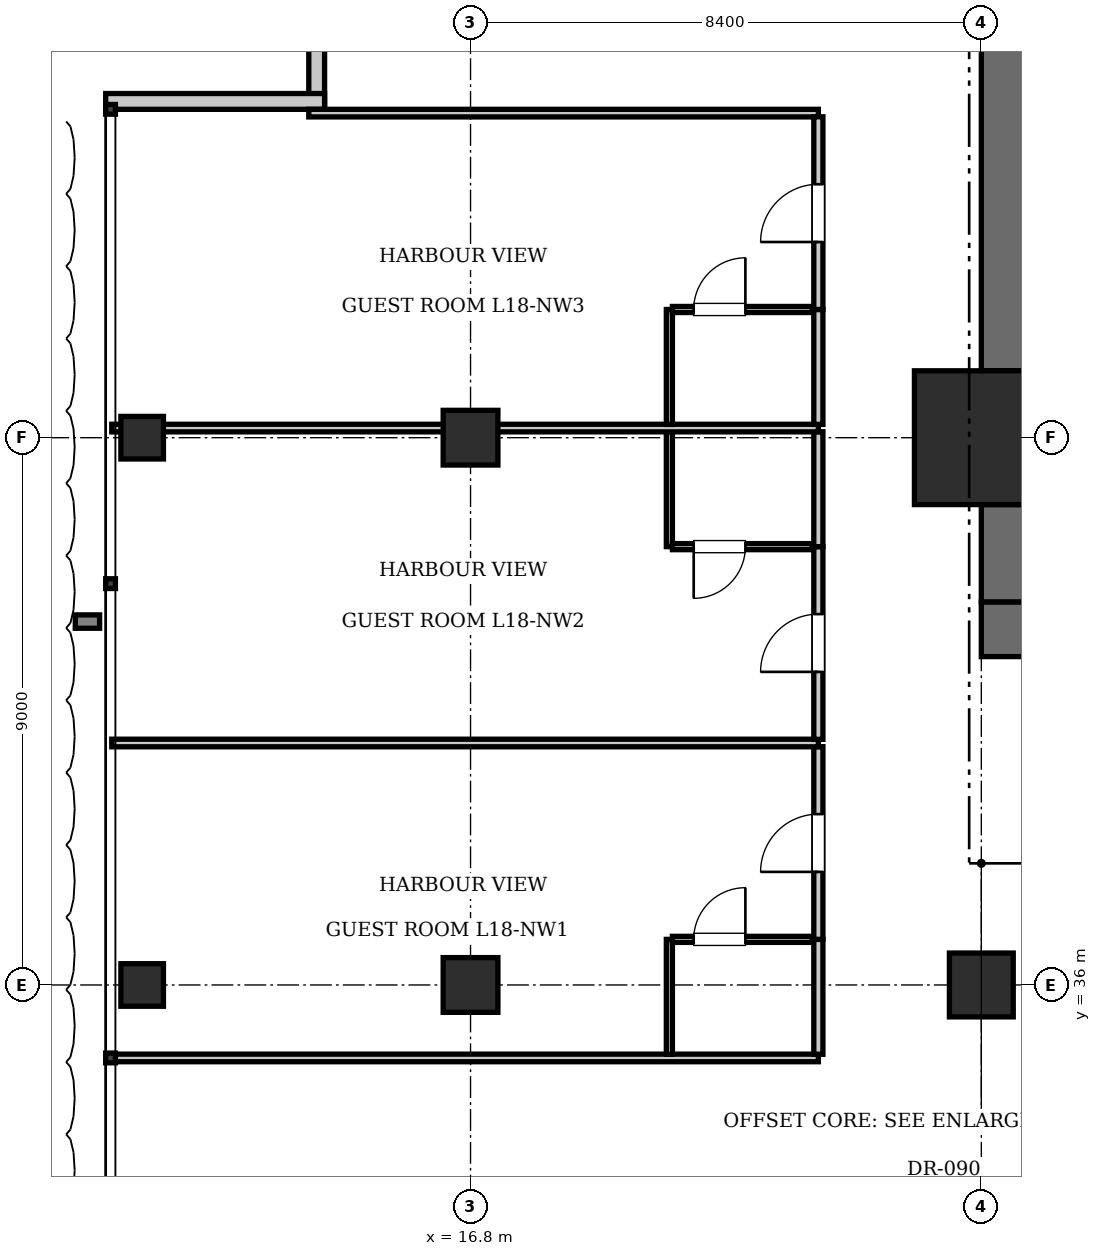
"""IFC4 building model, lengths in metres.
Left out: names, types, materials, properties, quantities, classifications, styles, units other than length and angle.
Written with IfcOpenShell. Run it as: python <this file> out.ifc"""

import sys

from ifc_helpers import new_model, si_unit, direction, frame, frame_2d, origin, origin_2d, place, context, subcontext, project, spatial, rectangle, i_section, extrude, element, fill, save


model = new_model("IFC4")
c1 = context("Model", 3, precision=1e-05, world=origin(), true_north=direction((0.0, 1.0)))
c2 = subcontext(c1, "Body", "Model", "MODEL_VIEW")
j1 = project(units=[si_unit("LENGTHUNIT", "METRE"), si_unit("PLANEANGLEUNIT", "RADIAN")], contexts=[c1])
p1 = place(None, origin())
s1 = spatial("IfcSite", under=j1, at=p1, CompositionType="ELEMENT")
p2 = place(p1, origin())
s2 = spatial("IfcBuilding", under=s1, at=p2, CompositionType="ELEMENT")
p3 = place(p2, frame((0.0, 0.0, 77.0)))
s3 = spatial("IfcBuildingStorey", under=s2, at=p3, CompositionType="ELEMENT", Elevation=77.0)
p4 = place(p3, frame((25.2, 45.0, 0.0), z_axis=(0.0, 0.0, 1.0), x_axis=(1.0, 0.0, 0.0)))
e1 = element("IfcColumn", 1, at=p4, inside=s3, PredefinedType="COLUMN", context=c2, shape_type="SweptSolid", body=[
    extrude(rectangle(XDim=2.2, YDim=2.2, at=origin_2d()), origin(), (0.0, 0.0, 1.0), 3.85),
])
p5 = place(p3, frame((25.2, 41.85, 0.0), z_axis=(0.0, 0.0, 1.0), x_axis=(1.0, 0.0, 0.0)))
e2 = element("IfcWall", 2, at=p5, inside=s3, PredefinedType="SHEAR", context=c2, shape_type="SweptSolid", body=[
    extrude(rectangle(XDim=6.8, YDim=0.9, at=frame_2d((3.4, 0.0))), origin(), (0.0, 0.0, 1.0), 3.85),
])
p6 = place(p5, frame((1.65, 0.0, 0.0)))
e3 = element("IfcOpeningElement", 3, at=p6, cuts=e2, PredefinedType="OPENING", context=c2, shape_type="SweptSolid", body=[
    extrude(rectangle(XDim=1.15, YDim=2.15, at=frame_2d((0.575, 1.075))), frame((0.0, 0.46, 0.0), z_axis=(0.0, -1.0, 0.0), x_axis=(1.0, 0.0, 0.0)), (0.0, 0.0, 1.0), 0.92),
])
p7 = place(p5, frame((5.15, 0.0, 0.0)))
e4 = element("IfcOpeningElement", 4, at=p7, cuts=e2, PredefinedType="OPENING", context=c2, shape_type="SweptSolid", body=[
    extrude(rectangle(XDim=1.1, YDim=2.2, at=frame_2d((0.55, 1.1))), frame((0.0, 0.46, 0.0), z_axis=(0.0, -1.0, 0.0), x_axis=(1.0, 0.0, 0.0)), (0.0, 0.0, 1.0), 0.92),
])
p8 = place(p3, frame((25.65, 42.3, 0.0), z_axis=(0.0, 0.0, 1.0), x_axis=(0.0, 1.0, 0.0)))
e5 = element("IfcWall", 5, at=p8, inside=s3, PredefinedType="SHEAR", context=c2, shape_type="SweptSolid", body=[
    extrude(rectangle(XDim=1.6, YDim=0.9, at=frame_2d((0.8, 0.0))), origin(), (0.0, 0.0, 1.0), 3.85),
])
p9 = place(p3, frame((25.65, 46.1, 0.0), z_axis=(0.0, 0.0, 1.0), x_axis=(0.0, 1.0, 0.0)))
e6 = element("IfcWall", 6, at=p9, inside=s3, PredefinedType="SHEAR", context=c2, shape_type="SweptSolid", body=[
    extrude(rectangle(XDim=7.0, YDim=0.9, at=frame_2d((3.5, 0.0))), origin(), (0.0, 0.0, 1.0), 3.85),
])
p10 = place(p3, frame((25.2, 36.0, 0.0), z_axis=(0.0, 0.0, 1.0), x_axis=(1.0, 0.0, 0.0)))
e7 = element("IfcColumn", 7, at=p10, inside=s3, PredefinedType="COLUMN", context=c2, shape_type="SweptSolid", body=[
    extrude(rectangle(XDim=1.05, YDim=1.05, at=origin_2d()), origin(), (0.0, 0.0, 1.0), 3.85),
])
for number, where, z_axis, x_axis in (
    (8, (16.8, 36.0, 0.0), (0.0, 0.0, 1.0), (1.0, 0.0, 0.0)),
    (9, (16.8, 45.0, 0.0), (0.0, 0.0, 1.0), (1.0, 0.0, 0.0)),
):
    element("IfcColumn", number, at=place(p3, frame(where, z_axis=z_axis, x_axis=x_axis)), inside=s3, PredefinedType="COLUMN", context=c2, shape_type="SweptSolid", body=[
        extrude(rectangle(XDim=0.9, YDim=0.9, at=origin_2d()), origin(), (0.0, 0.0, 1.0), 3.85),
    ])
for number, where, z_axis, x_axis in (
    (10, (11.4, 36.0, 0.0), (0.0, 0.0, 1.0), (1.0, 0.0, 0.0)),
    (11, (11.4, 45.0, 0.0), (0.0, 0.0, 1.0), (1.0, 0.0, 0.0)),
):
    element("IfcColumn", number, at=place(p3, frame(where, z_axis=z_axis, x_axis=x_axis)), inside=s3, PredefinedType="COLUMN", context=c2, shape_type="SweptSolid", body=[
        extrude(i_section(OverallWidth=0.7, OverallDepth=0.7, WebThickness=0.028, FlangeThickness=0.044, at=origin_2d()), origin(), (0.0, 0.0, 1.0), 3.85),
    ])
p11 = place(p3, frame((14.27, 50.4, 0.0), z_axis=(0.0, 0.0, 1.0), x_axis=(0.0, 1.0, 0.0)))
e12 = element("IfcWall", 12, at=p11, inside=s3, PredefinedType="SOLIDWALL", context=c2, shape_type="SweptSolid", body=[
    extrude(rectangle(XDim=3.6, YDim=0.26, at=frame_2d((1.8, 0.0))), origin(), (0.0, 0.0, 1.0), 3.61),
])
p12 = place(p3, frame((10.8, 50.53, 0.0), z_axis=(0.0, 0.0, 1.0), x_axis=(1.0, 0.0, 0.0)))
e13 = element("IfcWall", 13, at=p12, inside=s3, PredefinedType="SOLIDWALL", context=c2, shape_type="SweptSolid", body=[
    extrude(rectangle(XDim=3.6, YDim=0.26, at=frame_2d((1.8, 0.0))), origin(), (0.0, 0.0, 1.0), 3.61),
])
p13 = place(p3, frame((10.9, 34.8, 0.0), z_axis=(0.0, 0.0, 1.0), x_axis=(1.0, 0.0, 0.0)))
e14 = element("IfcWall", 14, at=p13, inside=s3, PredefinedType="PARTITIONING", context=c2, shape_type="SweptSolid", body=[
    extrude(rectangle(XDim=11.62, YDim=0.125, at=frame_2d((5.81, 0.0))), origin(), (0.0, 0.0, 1.0), 3.61),
])
p14 = place(p3, frame((14.14, 50.337, 0.0), z_axis=(0.0, 0.0, 1.0), x_axis=(1.0, 0.0, 0.0)))
e15 = element("IfcWall", 15, at=p14, inside=s3, PredefinedType="PARTITIONING", context=c2, shape_type="SweptSolid", body=[
    extrude(rectangle(XDim=8.38, YDim=0.125, at=frame_2d((4.19, 0.0))), origin(), (0.0, 0.0, 1.0), 3.61),
])
p15 = place(p3, frame((22.52, 34.86, 0.0), z_axis=(0.0, 0.0, 1.0), x_axis=(0.0, 1.0, 0.0)))
e16 = element("IfcWall", 16, at=p15, inside=s3, PredefinedType="PARTITIONING", context=c2, shape_type="SweptSolid", body=[
    extrude(rectangle(XDim=1.89, YDim=0.15, at=frame_2d((0.945, 0.0))), origin(), (0.0, 0.0, 1.0), 3.61),
])
p16 = place(p3, frame((22.52, 36.75, 0.0), z_axis=(0.0, 0.0, 1.0), x_axis=(0.0, 1.0, 0.0)))
e17 = element("IfcWall", 17, at=p16, inside=s3, PredefinedType="PARTITIONING", context=c2, shape_type="SweptSolid", body=[
    extrude(rectangle(XDim=3.169, YDim=0.15, at=frame_2d((1.584, 0.0))), origin(), (0.0, 0.0, 1.0), 3.61),
])
p17 = place(p16, frame((1.11, 0.0, 0.0)))
e18 = element("IfcOpeningElement", 18, at=p17, cuts=e17, PredefinedType="OPENING", context=c2, shape_type="SweptSolid", body=[
    extrude(rectangle(XDim=0.95, YDim=2.15, at=frame_2d((0.475, 1.075))), frame((0.0, 0.085, 0.0), z_axis=(0.0, -1.0, 0.0), x_axis=(1.0, 0.0, 0.0)), (0.0, 0.0, 1.0), 0.17),
])
p18 = place(p3, frame((20.07, 34.86, 0.0), z_axis=(0.0, 0.0, 1.0), x_axis=(0.0, 1.0, 0.0)))
e19 = element("IfcWall", 19, at=p18, inside=s3, PredefinedType="PARTITIONING", context=c2, shape_type="SweptSolid", body=[
    extrude(rectangle(XDim=1.89, YDim=0.1, at=frame_2d((0.945, 0.0))), origin(), (0.0, 0.0, 1.0), 3.61),
])
p19 = place(p3, frame((20.12, 36.75, 0.0), z_axis=(0.0, 0.0, 1.0), x_axis=(1.0, 0.0, 0.0)))
e20 = element("IfcWall", 20, at=p19, inside=s3, PredefinedType="PARTITIONING", context=c2, shape_type="SweptSolid", body=[
    extrude(rectangle(XDim=2.3, YDim=0.1, at=frame_2d((1.15, 0.0))), origin(), (0.0, 0.0, 1.0), 3.61),
])
p20 = place(p19, frame((0.35, 0.0, 0.0)))
e21 = element("IfcOpeningElement", 21, at=p20, cuts=e20, PredefinedType="OPENING", context=c2, shape_type="SweptSolid", body=[
    extrude(rectangle(XDim=0.85, YDim=2.1, at=frame_2d((0.425, 1.05))), frame((0.0, 0.06, 0.0), z_axis=(0.0, -1.0, 0.0), x_axis=(1.0, 0.0, 0.0)), (0.0, 0.0, 1.0), 0.12),
])
p21 = place(p3, frame((10.9, 39.979, 0.0), z_axis=(0.0, 0.0, 1.0), x_axis=(1.0, 0.0, 0.0)))
e22 = element("IfcWall", 22, at=p21, inside=s3, PredefinedType="PARTITIONING", context=c2, shape_type="SweptSolid", body=[
    extrude(rectangle(XDim=11.62, YDim=0.125, at=frame_2d((5.81, 0.0))), origin(), (0.0, 0.0, 1.0), 3.61),
])
p22 = place(p3, frame((22.52, 40.039, 0.0), z_axis=(0.0, 0.0, 1.0), x_axis=(0.0, 1.0, 0.0)))
e23 = element("IfcWall", 23, at=p22, inside=s3, PredefinedType="PARTITIONING", context=c2, shape_type="SweptSolid", body=[
    extrude(rectangle(XDim=3.169, YDim=0.15, at=frame_2d((1.584, 0.0))), origin(), (0.0, 0.0, 1.0), 3.61),
])
p23 = place(p22, frame((1.11, 0.0, 0.0)))
e24 = element("IfcOpeningElement", 24, at=p23, cuts=e23, PredefinedType="OPENING", context=c2, shape_type="SweptSolid", body=[
    extrude(rectangle(XDim=0.95, YDim=2.15, at=frame_2d((0.475, 1.075))), frame((0.0, 0.085, 0.0), z_axis=(0.0, -1.0, 0.0), x_axis=(1.0, 0.0, 0.0)), (0.0, 0.0, 1.0), 0.17),
])
p24 = place(p3, frame((22.52, 43.208, 0.0), z_axis=(0.0, 0.0, 1.0), x_axis=(0.0, 1.0, 0.0)))
e25 = element("IfcWall", 25, at=p24, inside=s3, PredefinedType="PARTITIONING", context=c2, shape_type="SweptSolid", body=[
    extrude(rectangle(XDim=1.89, YDim=0.15, at=frame_2d((0.945, 0.0))), origin(), (0.0, 0.0, 1.0), 3.61),
])
p25 = place(p3, frame((20.07, 43.208, 0.0), z_axis=(0.0, 0.0, 1.0), x_axis=(0.0, 1.0, 0.0)))
e26 = element("IfcWall", 26, at=p25, inside=s3, PredefinedType="PARTITIONING", context=c2, shape_type="SweptSolid", body=[
    extrude(rectangle(XDim=1.89, YDim=0.1, at=frame_2d((0.945, 0.0))), origin(), (0.0, 0.0, 1.0), 3.61),
])
p26 = place(p3, frame((20.12, 43.208, 0.0), z_axis=(0.0, 0.0, 1.0), x_axis=(1.0, 0.0, 0.0)))
e27 = element("IfcWall", 27, at=p26, inside=s3, PredefinedType="PARTITIONING", context=c2, shape_type="SweptSolid", body=[
    extrude(rectangle(XDim=2.3, YDim=0.1, at=frame_2d((1.15, 0.0))), origin(), (0.0, 0.0, 1.0), 3.61),
])
p27 = place(p26, frame((0.35, 0.0, 0.0)))
e28 = element("IfcOpeningElement", 28, at=p27, cuts=e27, PredefinedType="OPENING", context=c2, shape_type="SweptSolid", body=[
    extrude(rectangle(XDim=0.85, YDim=2.1, at=frame_2d((0.425, 1.05))), frame((0.0, 0.06, 0.0), z_axis=(0.0, -1.0, 0.0), x_axis=(1.0, 0.0, 0.0)), (0.0, 0.0, 1.0), 0.12),
])
p28 = place(p3, frame((10.9, 45.158, 0.0), z_axis=(0.0, 0.0, 1.0), x_axis=(1.0, 0.0, 0.0)))
e29 = element("IfcWall", 29, at=p28, inside=s3, PredefinedType="PARTITIONING", context=c2, shape_type="SweptSolid", body=[
    extrude(rectangle(XDim=11.62, YDim=0.125, at=frame_2d((5.81, 0.0))), origin(), (0.0, 0.0, 1.0), 2.999),
])
p29 = place(p3, frame((22.52, 45.218, 0.0), z_axis=(0.0, 0.0, 1.0), x_axis=(0.0, 1.0, 0.0)))
e30 = element("IfcWall", 30, at=p29, inside=s3, PredefinedType="PARTITIONING", context=c2, shape_type="SweptSolid", body=[
    extrude(rectangle(XDim=1.89, YDim=0.15, at=frame_2d((0.945, 0.0))), origin(), (0.0, 0.0, 1.0), 3.61),
])
p30 = place(p3, frame((22.52, 47.108, 0.0), z_axis=(0.0, 0.0, 1.0), x_axis=(0.0, 1.0, 0.0)))
e31 = element("IfcWall", 31, at=p30, inside=s3, PredefinedType="PARTITIONING", context=c2, shape_type="SweptSolid", body=[
    extrude(rectangle(XDim=3.169, YDim=0.15, at=frame_2d((1.584, 0.0))), origin(), (0.0, 0.0, 1.0), 3.61),
])
p31 = place(p30, frame((1.11, 0.0, 0.0)))
e32 = element("IfcOpeningElement", 32, at=p31, cuts=e31, PredefinedType="OPENING", context=c2, shape_type="SweptSolid", body=[
    extrude(rectangle(XDim=0.95, YDim=2.15, at=frame_2d((0.475, 1.075))), frame((0.0, 0.085, 0.0), z_axis=(0.0, -1.0, 0.0), x_axis=(1.0, 0.0, 0.0)), (0.0, 0.0, 1.0), 0.17),
])
p32 = place(p3, frame((20.07, 45.218, 0.0), z_axis=(0.0, 0.0, 1.0), x_axis=(0.0, 1.0, 0.0)))
e33 = element("IfcWall", 33, at=p32, inside=s3, PredefinedType="PARTITIONING", context=c2, shape_type="SweptSolid", body=[
    extrude(rectangle(XDim=1.89, YDim=0.1, at=frame_2d((0.945, 0.0))), origin(), (0.0, 0.0, 1.0), 3.61),
])
p33 = place(p3, frame((20.12, 47.108, 0.0), z_axis=(0.0, 0.0, 1.0), x_axis=(1.0, 0.0, 0.0)))
e34 = element("IfcWall", 34, at=p33, inside=s3, PredefinedType="PARTITIONING", context=c2, shape_type="SweptSolid", body=[
    extrude(rectangle(XDim=2.3, YDim=0.1, at=frame_2d((1.15, 0.0))), origin(), (0.0, 0.0, 1.0), 3.61),
])
p34 = place(p33, frame((0.35, 0.0, 0.0)))
e35 = element("IfcOpeningElement", 35, at=p34, cuts=e34, PredefinedType="OPENING", context=c2, shape_type="SweptSolid", body=[
    extrude(rectangle(XDim=0.85, YDim=2.1, at=frame_2d((0.425, 1.05))), frame((0.0, 0.06, 0.0), z_axis=(0.0, -1.0, 0.0), x_axis=(1.0, 0.0, 0.0)), (0.0, 0.0, 1.0), 0.12),
])
p35 = place(p20, origin())
e36 = element("IfcDoor", 36, at=p35, inside=s3, OperationType="SINGLE_SWING_RIGHT", PredefinedType="DOOR", context=c2, shape_type="SweptSolid", body=[
    extrude(rectangle(XDim=0.85, YDim=2.1, at=frame_2d((0.425, 1.05))), frame((0.0, 0.025, 0.0), z_axis=(0.0, -1.0, 0.0), x_axis=(1.0, 0.0, 0.0)), (0.0, 0.0, 1.0), 0.05),
])
fill(e21, e36)
p36 = place(p17, origin())
e37 = element("IfcDoor", 37, at=p36, inside=s3, OperationType="SINGLE_SWING_LEFT", PredefinedType="DOOR", context=c2, shape_type="SweptSolid", body=[
    extrude(rectangle(XDim=0.95, YDim=2.15, at=frame_2d((0.475, 1.075))), frame((0.0, 0.025, 0.0), z_axis=(0.0, -1.0, 0.0), x_axis=(1.0, 0.0, 0.0)), (0.0, 0.0, 1.0), 0.05),
])
fill(e18, e37)
p37 = place(p27, frame((0.85, 0.0, 0.0), z_axis=(0.0, 0.0, 1.0), x_axis=(-1.0, 0.0, 0.0)))
e38 = element("IfcDoor", 38, at=p37, inside=s3, OperationType="SINGLE_SWING_RIGHT", PredefinedType="DOOR", context=c2, shape_type="SweptSolid", body=[
    extrude(rectangle(XDim=0.85, YDim=2.1, at=frame_2d((0.425, 1.05))), frame((0.0, 0.025, 0.0), z_axis=(0.0, -1.0, 0.0), x_axis=(1.0, 0.0, 0.0)), (0.0, 0.0, 1.0), 0.05),
])
fill(e28, e38)
p38 = place(p23, origin())
e39 = element("IfcDoor", 39, at=p38, inside=s3, OperationType="SINGLE_SWING_LEFT", PredefinedType="DOOR", context=c2, shape_type="SweptSolid", body=[
    extrude(rectangle(XDim=0.95, YDim=2.15, at=frame_2d((0.475, 1.075))), frame((0.0, 0.025, 0.0), z_axis=(0.0, -1.0, 0.0), x_axis=(1.0, 0.0, 0.0)), (0.0, 0.0, 1.0), 0.05),
])
fill(e24, e39)
p39 = place(p34, origin())
e40 = element("IfcDoor", 40, at=p39, inside=s3, OperationType="SINGLE_SWING_RIGHT", PredefinedType="DOOR", context=c2, shape_type="SweptSolid", body=[
    extrude(rectangle(XDim=0.85, YDim=2.1, at=frame_2d((0.425, 1.05))), frame((0.0, 0.025, 0.0), z_axis=(0.0, -1.0, 0.0), x_axis=(1.0, 0.0, 0.0)), (0.0, 0.0, 1.0), 0.05),
])
fill(e35, e40)
p40 = place(p31, origin())
e41 = element("IfcDoor", 41, at=p40, inside=s3, OperationType="SINGLE_SWING_LEFT", PredefinedType="DOOR", context=c2, shape_type="SweptSolid", body=[
    extrude(rectangle(XDim=0.95, YDim=2.15, at=frame_2d((0.475, 1.075))), frame((0.0, 0.025, 0.0), z_axis=(0.0, -1.0, 0.0), x_axis=(1.0, 0.0, 0.0)), (0.0, 0.0, 1.0), 0.05),
])
fill(e32, e41)
save(model, sys.argv[1])
